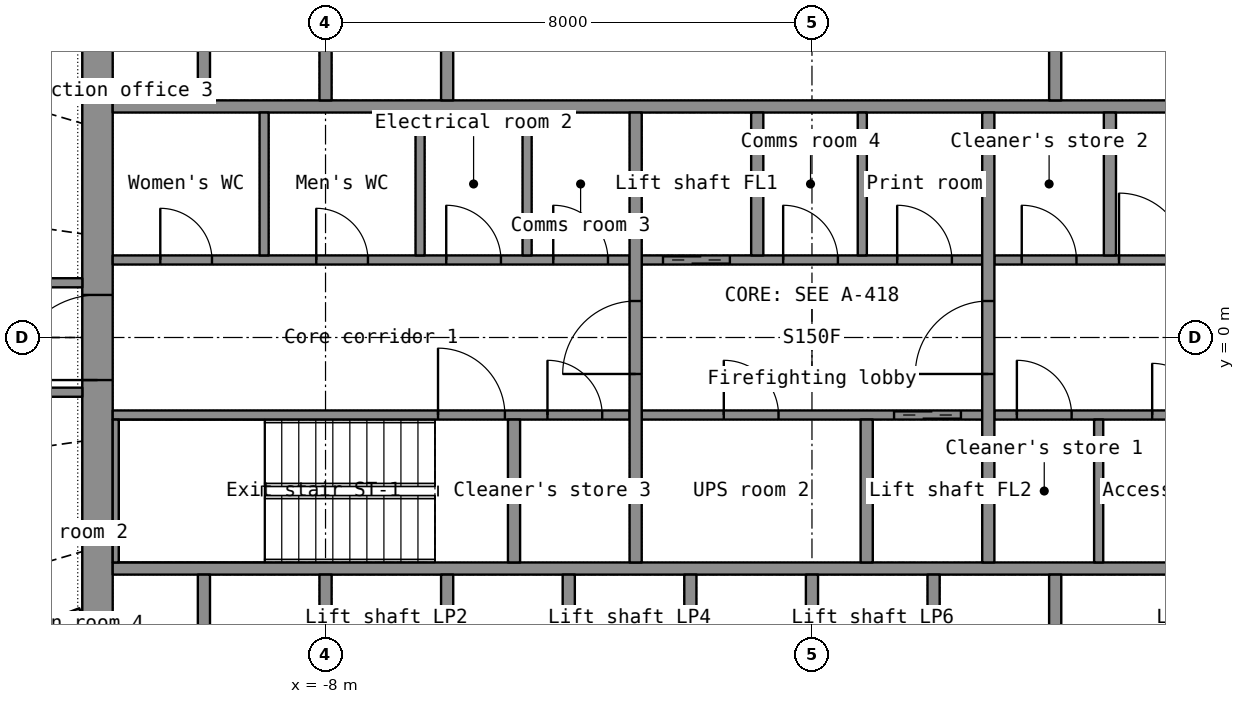
"""IFC4 building model, lengths in metres.
Left out: names, types, materials, properties, quantities, classifications, styles, units other than length and angle.
Written with IfcOpenShell. Run it as: python <this file> out.ifc"""

import sys

from ifc_helpers import new_model, si_unit, direction, frame, frame_2d, origin, place, context, subcontext, project, spatial, rectangle, extrude, element, fill, save


model = new_model("IFC4")
c1 = context("Model", 3, precision=1e-05, world=origin(), true_north=direction((0.0, 1.0)))
c2 = subcontext(c1, "Body", "Model", "MODEL_VIEW")
j1 = project(units=[si_unit("LENGTHUNIT", "METRE"), si_unit("PLANEANGLEUNIT", "RADIAN")], contexts=[c1])
p1 = place(None, origin())
s1 = spatial("IfcSite", under=j1, at=p1, CompositionType="ELEMENT")
p2 = place(p1, origin())
s2 = spatial("IfcBuilding", under=s1, at=p2, CompositionType="ELEMENT")
p3 = place(p2, frame((0.0, 0.0, 130.4)))
s3 = spatial("IfcBuildingStorey", under=s2, at=p3, CompositionType="ELEMENT", Elevation=130.4)
p4 = place(p3, frame((-11.75, -7.2, 0.0), z_axis=(0.0, 0.0, 1.0), x_axis=(0.0, 1.0, 0.0)))
e1 = element("IfcWall", 1, at=p4, inside=s3, PredefinedType="SHEAR", context=c2, shape_type="SweptSolid", body=[
    extrude(rectangle(XDim=14.4, YDim=0.5, at=frame_2d((7.2, 0.0))), origin(), (0.0, 0.0, 1.0), 3.3),
])
p5 = place(p4, frame((6.5, 0.0, 0.0)))
e2 = element("IfcOpeningElement", 2, at=p5, cuts=e1, PredefinedType="OPENING", context=c2, shape_type="SweptSolid", body=[
    extrude(rectangle(XDim=1.4, YDim=2.2, at=frame_2d((0.7, 1.1))), frame((0.0, 0.26, 0.0), z_axis=(0.0, -1.0, 0.0), x_axis=(1.0, 0.0, 0.0)), (0.0, 0.0, 1.0), 0.52),
])
for number, where, z_axis, x_axis in (
    (3, (-11.5, -3.8, 0.0), (0.0, 0.0, 1.0), (1.0, 0.0, 0.0)),
    (4, (-11.5, 3.8, 0.0), (0.0, 0.0, 1.0), (1.0, 0.0, 0.0)),
):
    element("IfcWall", number, at=place(p3, frame(where, z_axis=z_axis, x_axis=x_axis)), inside=s3, PredefinedType="SHEAR", context=c2, shape_type="SweptSolid", body=[
        extrude(rectangle(XDim=23.0, YDim=0.2, at=frame_2d((11.5, 0.0))), origin(), (0.0, 0.0, 1.0), 3.3),
    ])
for number, where, z_axis, x_axis in (
    (5, (-10.0, -6.7, 0.0), (0.0, 0.0, 1.0), (0.0, 1.0, 0.0)),
    (6, (-8.0, -6.7, 0.0), (0.0, 0.0, 1.0), (0.0, 1.0, 0.0)),
    (7, (-6.0, -6.7, 0.0), (0.0, 0.0, 1.0), (0.0, 1.0, 0.0)),
    (8, (-4.0, -6.7, 0.0), (0.0, 0.0, 1.0), (0.0, 1.0, 0.0)),
    (9, (-2.0, -6.7, 0.0), (0.0, 0.0, 1.0), (0.0, 1.0, 0.0)),
    (10, (0.0, -6.7, 0.0), (0.0, 0.0, 1.0), (0.0, 1.0, 0.0)),
    (11, (2.0, -6.7, 0.0), (0.0, 0.0, 1.0), (0.0, 1.0, 0.0)),
    (12, (4.0, -6.7, 0.0), (0.0, 0.0, 1.0), (0.0, 1.0, 0.0)),
    (13, (-10.0, 3.9, 0.0), (0.0, 0.0, 1.0), (0.0, 1.0, 0.0)),
    (14, (-8.0, 3.9, 0.0), (0.0, 0.0, 1.0), (0.0, 1.0, 0.0)),
    (15, (-6.0, 3.9, 0.0), (0.0, 0.0, 1.0), (0.0, 1.0, 0.0)),
):
    element("IfcWall", number, at=place(p3, frame(where, z_axis=z_axis, x_axis=x_axis)), inside=s3, PredefinedType="SHEAR", context=c2, shape_type="SweptSolid", body=[
        extrude(rectangle(XDim=2.8, YDim=0.2, at=frame_2d((1.4, 0.0))), origin(), (0.0, 0.0, 1.0), 3.3),
    ])
p6 = place(p3, frame((4.0, 3.9, 0.0), z_axis=(0.0, 0.0, 1.0), x_axis=(0.0, 1.0, 0.0)))
e16 = element("IfcWall", 16, at=p6, inside=s3, PredefinedType="PARTITIONING", context=c2, shape_type="SweptSolid", body=[
    extrude(rectangle(XDim=2.8, YDim=0.2, at=frame_2d((1.4, 0.0))), origin(), (0.0, 0.0, 1.0), 3.3),
])
p7 = place(p3, frame((-11.5, -1.275, 0.0), z_axis=(0.0, 0.0, 1.0), x_axis=(1.0, 0.0, 0.0)))
e17 = element("IfcWall", 17, at=p7, inside=s3, PredefinedType="SHEAR", context=c2, shape_type="SweptSolid", body=[
    extrude(rectangle(XDim=8.5, YDim=0.15, at=frame_2d((4.25, 0.0))), origin(), (0.0, 0.0, 1.0), 3.3),
])
p8 = place(p7, frame((5.35, 0.0, 0.0)))
e18 = element("IfcOpeningElement", 18, at=p8, cuts=e17, PredefinedType="OPENING", context=c2, shape_type="SweptSolid", body=[
    extrude(rectangle(XDim=1.1, YDim=2.15, at=frame_2d((0.55, 1.075))), frame((0.0, 0.085, 0.0), z_axis=(0.0, -1.0, 0.0), x_axis=(1.0, 0.0, 0.0)), (0.0, 0.0, 1.0), 0.17),
])
p9 = place(p7, frame((7.15, 0.0, 0.0)))
e19 = element("IfcOpeningElement", 19, at=p9, cuts=e17, PredefinedType="OPENING", context=c2, shape_type="SweptSolid", body=[
    extrude(rectangle(XDim=0.9, YDim=2.1, at=frame_2d((0.45, 1.05))), frame((0.0, 0.085, 0.0), z_axis=(0.0, -1.0, 0.0), x_axis=(1.0, 0.0, 0.0)), (0.0, 0.0, 1.0), 0.17),
])
p10 = place(p3, frame((-2.8, -1.275, 0.0), z_axis=(0.0, 0.0, 1.0), x_axis=(1.0, 0.0, 0.0)))
e20 = element("IfcWall", 20, at=p10, inside=s3, PredefinedType="SHEAR", context=c2, shape_type="SweptSolid", body=[
    extrude(rectangle(XDim=5.6, YDim=0.15, at=frame_2d((2.8, 0.0))), origin(), (0.0, 0.0, 1.0), 3.3),
])
p11 = place(p10, frame((4.15, 0.0, 0.0)))
e21 = element("IfcOpeningElement", 21, at=p11, cuts=e20, PredefinedType="OPENING", context=c2, shape_type="SweptSolid", body=[
    extrude(rectangle(XDim=1.1, YDim=2.2, at=frame_2d((0.55, 1.1))), frame((0.0, 0.085, 0.0), z_axis=(0.0, -1.0, 0.0), x_axis=(1.0, 0.0, 0.0)), (0.0, 0.0, 1.0), 0.17),
])
p12 = place(p10, frame((1.35, 0.0, 0.0)))
e22 = element("IfcOpeningElement", 22, at=p12, cuts=e20, PredefinedType="OPENING", context=c2, shape_type="SweptSolid", body=[
    extrude(rectangle(XDim=0.9, YDim=2.1, at=frame_2d((0.45, 1.05))), frame((0.0, 0.085, 0.0), z_axis=(0.0, -1.0, 0.0), x_axis=(1.0, 0.0, 0.0)), (0.0, 0.0, 1.0), 0.17),
])
p13 = place(p3, frame((3.0, -1.275, 0.0), z_axis=(0.0, 0.0, 1.0), x_axis=(1.0, 0.0, 0.0)))
e23 = element("IfcWall", 23, at=p13, inside=s3, PredefinedType="PARTITIONING", context=c2, shape_type="SweptSolid", body=[
    extrude(rectangle(XDim=8.5, YDim=0.15, at=frame_2d((4.25, 0.0))), origin(), (0.0, 0.0, 1.0), 3.3),
])
p14 = place(p13, frame((0.37, 0.0, 0.0)))
e24 = element("IfcOpeningElement", 24, at=p14, cuts=e23, PredefinedType="OPENING", context=c2, shape_type="SweptSolid", body=[
    extrude(rectangle(XDim=0.9, YDim=2.1, at=frame_2d((0.45, 1.05))), frame((0.0, 0.085, 0.0), z_axis=(0.0, -1.0, 0.0), x_axis=(1.0, 0.0, 0.0)), (0.0, 0.0, 1.0), 0.17),
])
p15 = place(p13, frame((2.595, 0.0, 0.0)))
e25 = element("IfcOpeningElement", 25, at=p15, cuts=e23, PredefinedType="OPENING", context=c2, shape_type="SweptSolid", body=[
    extrude(rectangle(XDim=0.85, YDim=2.1, at=frame_2d((0.425, 1.05))), frame((0.0, 0.085, 0.0), z_axis=(0.0, -1.0, 0.0), x_axis=(1.0, 0.0, 0.0)), (0.0, 0.0, 1.0), 0.17),
])
p16 = place(p13, frame((6.025, 0.0, 0.0)))
e26 = element("IfcOpeningElement", 26, at=p16, cuts=e23, PredefinedType="OPENING", context=c2, shape_type="SweptSolid", body=[
    extrude(rectangle(XDim=0.85, YDim=2.1, at=frame_2d((0.425, 1.05))), frame((0.0, 0.085, 0.0), z_axis=(0.0, -1.0, 0.0), x_axis=(1.0, 0.0, 0.0)), (0.0, 0.0, 1.0), 0.17),
])
p17 = place(p3, frame((-11.5, 1.275, 0.0), z_axis=(0.0, 0.0, 1.0), x_axis=(1.0, 0.0, 0.0)))
e27 = element("IfcWall", 27, at=p17, inside=s3, PredefinedType="PARTITIONING", context=c2, shape_type="SweptSolid", body=[
    extrude(rectangle(XDim=8.5, YDim=0.15, at=frame_2d((4.25, 0.0))), origin(), (0.0, 0.0, 1.0), 3.3),
])
p18 = place(p17, frame((0.782, 0.0, 0.0)))
e28 = element("IfcOpeningElement", 28, at=p18, cuts=e27, PredefinedType="OPENING", context=c2, shape_type="SweptSolid", body=[
    extrude(rectangle(XDim=0.85, YDim=2.1, at=frame_2d((0.425, 1.05))), frame((0.0, 0.085, 0.0), z_axis=(0.0, -1.0, 0.0), x_axis=(1.0, 0.0, 0.0)), (0.0, 0.0, 1.0), 0.17),
])
p19 = place(p17, frame((3.347, 0.0, 0.0)))
e29 = element("IfcOpeningElement", 29, at=p19, cuts=e27, PredefinedType="OPENING", context=c2, shape_type="SweptSolid", body=[
    extrude(rectangle(XDim=0.85, YDim=2.1, at=frame_2d((0.425, 1.05))), frame((0.0, 0.085, 0.0), z_axis=(0.0, -1.0, 0.0), x_axis=(1.0, 0.0, 0.0)), (0.0, 0.0, 1.0), 0.17),
])
p20 = place(p17, frame((5.485, 0.0, 0.0)))
e30 = element("IfcOpeningElement", 30, at=p20, cuts=e27, PredefinedType="OPENING", context=c2, shape_type="SweptSolid", body=[
    extrude(rectangle(XDim=0.9, YDim=2.1, at=frame_2d((0.45, 1.05))), frame((0.0, 0.085, 0.0), z_axis=(0.0, -1.0, 0.0), x_axis=(1.0, 0.0, 0.0)), (0.0, 0.0, 1.0), 0.17),
])
p21 = place(p17, frame((7.245, 0.0, 0.0)))
e31 = element("IfcOpeningElement", 31, at=p21, cuts=e27, PredefinedType="OPENING", context=c2, shape_type="SweptSolid", body=[
    extrude(rectangle(XDim=0.9, YDim=2.1, at=frame_2d((0.45, 1.05))), frame((0.0, 0.085, 0.0), z_axis=(0.0, -1.0, 0.0), x_axis=(1.0, 0.0, 0.0)), (0.0, 0.0, 1.0), 0.17),
])
p22 = place(p3, frame((-2.8, 1.275, 0.0), z_axis=(0.0, 0.0, 1.0), x_axis=(1.0, 0.0, 0.0)))
e32 = element("IfcWall", 32, at=p22, inside=s3, PredefinedType="SHEAR", context=c2, shape_type="SweptSolid", body=[
    extrude(rectangle(XDim=5.6, YDim=0.15, at=frame_2d((2.8, 0.0))), origin(), (0.0, 0.0, 1.0), 3.3),
])
p23 = place(p22, frame((0.35, 0.0, 0.0)))
e33 = element("IfcOpeningElement", 33, at=p23, cuts=e32, PredefinedType="OPENING", context=c2, shape_type="SweptSolid", body=[
    extrude(rectangle(XDim=1.1, YDim=2.2, at=frame_2d((0.55, 1.1))), frame((0.0, 0.085, 0.0), z_axis=(0.0, -1.0, 0.0), x_axis=(1.0, 0.0, 0.0)), (0.0, 0.0, 1.0), 0.17),
])
p24 = place(p22, frame((2.326, 0.0, 0.0)))
e34 = element("IfcOpeningElement", 34, at=p24, cuts=e32, PredefinedType="OPENING", context=c2, shape_type="SweptSolid", body=[
    extrude(rectangle(XDim=0.9, YDim=2.1, at=frame_2d((0.45, 1.05))), frame((0.0, 0.085, 0.0), z_axis=(0.0, -1.0, 0.0), x_axis=(1.0, 0.0, 0.0)), (0.0, 0.0, 1.0), 0.17),
])
p25 = place(p22, frame((4.201, 0.0, 0.0)))
e35 = element("IfcOpeningElement", 35, at=p25, cuts=e32, PredefinedType="OPENING", context=c2, shape_type="SweptSolid", body=[
    extrude(rectangle(XDim=0.9, YDim=2.1, at=frame_2d((0.45, 1.05))), frame((0.0, 0.085, 0.0), z_axis=(0.0, -1.0, 0.0), x_axis=(1.0, 0.0, 0.0)), (0.0, 0.0, 1.0), 0.17),
])
p26 = place(p3, frame((3.0, 1.275, 0.0), z_axis=(0.0, 0.0, 1.0), x_axis=(1.0, 0.0, 0.0)))
e36 = element("IfcWall", 36, at=p26, inside=s3, PredefinedType="SHEAR", context=c2, shape_type="SweptSolid", body=[
    extrude(rectangle(XDim=8.5, YDim=0.15, at=frame_2d((4.25, 0.0))), origin(), (0.0, 0.0, 1.0), 3.3),
])
p27 = place(p26, frame((2.05, 0.0, 0.0)))
e37 = element("IfcOpeningElement", 37, at=p27, cuts=e36, PredefinedType="OPENING", context=c2, shape_type="SweptSolid", body=[
    extrude(rectangle(XDim=1.1, YDim=2.15, at=frame_2d((0.55, 1.075))), frame((0.0, 0.085, 0.0), z_axis=(0.0, -1.0, 0.0), x_axis=(1.0, 0.0, 0.0)), (0.0, 0.0, 1.0), 0.17),
])
p28 = place(p26, frame((0.45, 0.0, 0.0)))
e38 = element("IfcOpeningElement", 38, at=p28, cuts=e36, PredefinedType="OPENING", context=c2, shape_type="SweptSolid", body=[
    extrude(rectangle(XDim=0.9, YDim=2.1, at=frame_2d((0.45, 1.05))), frame((0.0, 0.085, 0.0), z_axis=(0.0, -1.0, 0.0), x_axis=(1.0, 0.0, 0.0)), (0.0, 0.0, 1.0), 0.17),
])
p29 = place(p3, frame((-2.9, -3.7, 0.0), z_axis=(0.0, 0.0, 1.0), x_axis=(0.0, 1.0, 0.0)))
e39 = element("IfcWall", 39, at=p29, inside=s3, PredefinedType="SHEAR", context=c2, shape_type="SweptSolid", body=[
    extrude(rectangle(XDim=7.4, YDim=0.2, at=frame_2d((3.7, 0.0))), origin(), (0.0, 0.0, 1.0), 3.3),
])
p30 = place(p29, frame((3.1, 0.0, 0.0)))
e40 = element("IfcOpeningElement", 40, at=p30, cuts=e39, PredefinedType="OPENING", context=c2, shape_type="SweptSolid", body=[
    extrude(rectangle(XDim=1.2, YDim=2.2, at=frame_2d((0.6, 1.1))), frame((0.0, 0.11, 0.0), z_axis=(0.0, -1.0, 0.0), x_axis=(1.0, 0.0, 0.0)), (0.0, 0.0, 1.0), 0.22),
])
p31 = place(p3, frame((2.9, -3.7, 0.0), z_axis=(0.0, 0.0, 1.0), x_axis=(0.0, 1.0, 0.0)))
e41 = element("IfcWall", 41, at=p31, inside=s3, PredefinedType="SHEAR", context=c2, shape_type="SweptSolid", body=[
    extrude(rectangle(XDim=7.4, YDim=0.2, at=frame_2d((3.7, 0.0))), origin(), (0.0, 0.0, 1.0), 3.3),
])
p32 = place(p31, frame((3.1, 0.0, 0.0)))
e42 = element("IfcOpeningElement", 42, at=p32, cuts=e41, PredefinedType="OPENING", context=c2, shape_type="SweptSolid", body=[
    extrude(rectangle(XDim=1.2, YDim=2.2, at=frame_2d((0.6, 1.1))), frame((0.0, 0.11, 0.0), z_axis=(0.0, -1.0, 0.0), x_axis=(1.0, 0.0, 0.0)), (0.0, 0.0, 1.0), 0.22),
])
for number, where, z_axis, x_axis in (
    (43, (-0.9, 1.35, 0.0), (0.0, 0.0, 1.0), (0.0, 1.0, 0.0)),
    (44, (0.9, -3.7, 0.0), (0.0, 0.0, 1.0), (0.0, 1.0, 0.0)),
):
    element("IfcWall", number, at=place(p3, frame(where, z_axis=z_axis, x_axis=x_axis)), inside=s3, PredefinedType="SHEAR", context=c2, shape_type="SweptSolid", body=[
        extrude(rectangle(XDim=2.35, YDim=0.2, at=frame_2d((1.175, 0.0))), origin(), (0.0, 0.0, 1.0), 3.3),
    ])
p33 = place(p3, frame((-11.45, -3.7, 0.0), z_axis=(0.0, 0.0, 1.0), x_axis=(0.0, 1.0, 0.0)))
e45 = element("IfcWall", 45, at=p33, inside=s3, PredefinedType="SHEAR", context=c2, shape_type="SweptSolid", body=[
    extrude(rectangle(XDim=2.35, YDim=0.1, at=frame_2d((1.175, 0.0))), origin(), (0.0, 0.0, 1.0), 3.3),
])
for number, where, z_axis, x_axis in (
    (46, (-4.9, -3.7, 0.0), (0.0, 0.0, 1.0), (0.0, 1.0, 0.0)),
    (47, (4.9, 1.35, 0.0), (0.0, 0.0, 1.0), (0.0, 1.0, 0.0)),
):
    element("IfcWall", number, at=place(p3, frame(where, z_axis=z_axis, x_axis=x_axis)), inside=s3, PredefinedType="SHEAR", context=c2, shape_type="SweptSolid", body=[
        extrude(rectangle(XDim=2.35, YDim=0.2, at=frame_2d((1.175, 0.0))), origin(), (0.0, 0.0, 1.0), 3.3),
    ])
for number, where, z_axis, x_axis in (
    (48, (-9.01, 1.35, 0.0), (0.0, 0.0, 1.0), (0.0, 1.0, 0.0)),
    (49, (-6.445, 1.35, 0.0), (0.0, 0.0, 1.0), (0.0, 1.0, 0.0)),
    (50, (-4.685, 1.35, 0.0), (0.0, 0.0, 1.0), (0.0, 1.0, 0.0)),
    (51, (4.715, -3.7, 0.0), (0.0, 0.0, 1.0), (0.0, 1.0, 0.0)),
    (52, (0.827, 1.35, 0.0), (0.0, 0.0, 1.0), (0.0, 1.0, 0.0)),
):
    element("IfcWall", number, at=place(p3, frame(where, z_axis=z_axis, x_axis=x_axis)), inside=s3, PredefinedType="PARTITIONING", context=c2, shape_type="SweptSolid", body=[
        extrude(rectangle(XDim=2.35, YDim=0.15, at=frame_2d((1.175, 0.0))), origin(), (0.0, 0.0, 1.0), 3.3),
    ])
p34 = place(p3, frame((-15.873, -6.063, 0.0), z_axis=(0.0, 0.0, 1.0), x_axis=(0.934170215, 0.356827703, 0.0)))
e53 = element("IfcWall", 53, at=p34, inside=s3, PredefinedType="PARTITIONING", context=c2, shape_type="SweptSolid", body=[
    extrude(rectangle(XDim=4.146, YDim=0.28, at=frame_2d((2.073, 0.0))), origin(), (0.0, 0.0, 1.0), 2.4),
])
p35 = place(p34, frame((1.323, 0.0, 1.0)))
e54 = element("IfcOpeningElement", 54, at=p35, cuts=e53, PredefinedType="OPENING", context=c2, shape_type="SweptSolid", body=[
    extrude(rectangle(XDim=1.5, YDim=1.2, at=frame_2d((0.75, 0.6))), frame((0.0, 0.15, 0.0), z_axis=(0.0, -1.0, 0.0), x_axis=(1.0, 0.0, 0.0)), (0.0, 0.0, 1.0), 0.3),
])
p36 = place(p3, frame((-12.0, 0.9, 0.0), z_axis=(0.0, 0.0, 1.0), x_axis=(-1.0, 0.0, 0.0)))
e55 = element("IfcWall", 55, at=p36, inside=s3, PredefinedType="PARTITIONING", context=c2, shape_type="SweptSolid", body=[
    extrude(rectangle(XDim=3.923, YDim=0.15, at=frame_2d((1.961, 0.0))), origin(), (0.0, 0.0, 1.0), 2.4),
])
p37 = place(p3, frame((-12.559, -0.9, 0.0), z_axis=(0.0, 0.0, 1.0), x_axis=(1.0, 0.0, 0.0)))
e56 = element("IfcWall", 56, at=p37, inside=s3, PredefinedType="PARTITIONING", context=c2, shape_type="SweptSolid", body=[
    extrude(rectangle(XDim=0.559, YDim=0.15, at=frame_2d((0.279, 0.0))), origin(), (0.0, 0.0, 1.0), 2.4),
])
p38 = place(p5, origin())
e57 = element("IfcDoor", 57, at=p38, inside=s3, OperationType="DOUBLE_DOOR_SINGLE_SWING", PredefinedType="DOOR", context=c2, shape_type="SweptSolid", body=[
    extrude(rectangle(XDim=1.4, YDim=2.2, at=frame_2d((0.7, 1.1))), frame((0.0, 0.025, 0.0), z_axis=(0.0, -1.0, 0.0), x_axis=(1.0, 0.0, 0.0)), (0.0, 0.0, 1.0), 0.05),
])
fill(e2, e57)
p39 = place(p30, origin())
e58 = element("IfcDoor", 58, at=p39, inside=s3, OperationType="SINGLE_SWING_LEFT", PredefinedType="DOOR", context=c2, shape_type="SweptSolid", body=[
    extrude(rectangle(XDim=1.2, YDim=2.2, at=frame_2d((0.6, 1.1))), frame((0.0, 0.025, 0.0), z_axis=(0.0, -1.0, 0.0), x_axis=(1.0, 0.0, 0.0)), (0.0, 0.0, 1.0), 0.05),
])
fill(e40, e58)
p40 = place(p32, origin())
e59 = element("IfcDoor", 59, at=p40, inside=s3, OperationType="SINGLE_SWING_LEFT", PredefinedType="DOOR", context=c2, shape_type="SweptSolid", body=[
    extrude(rectangle(XDim=1.2, YDim=2.2, at=frame_2d((0.6, 1.1))), frame((0.0, 0.025, 0.0), z_axis=(0.0, -1.0, 0.0), x_axis=(1.0, 0.0, 0.0)), (0.0, 0.0, 1.0), 0.05),
])
fill(e42, e59)
p41 = place(p23, origin())
e60 = element("IfcDoor", 60, at=p41, inside=s3, OperationType="DOUBLE_DOOR_SLIDING", PredefinedType="DOOR", context=c2, shape_type="SweptSolid", body=[
    extrude(rectangle(XDim=1.1, YDim=2.2, at=frame_2d((0.55, 1.1))), frame((0.0, 0.025, 0.0), z_axis=(0.0, -1.0, 0.0), x_axis=(1.0, 0.0, 0.0)), (0.0, 0.0, 1.0), 0.05),
])
fill(e33, e60)
p42 = place(p11, origin())
e61 = element("IfcDoor", 61, at=p42, inside=s3, OperationType="DOUBLE_DOOR_SLIDING", PredefinedType="DOOR", context=c2, shape_type="SweptSolid", body=[
    extrude(rectangle(XDim=1.1, YDim=2.2, at=frame_2d((0.55, 1.1))), frame((0.0, 0.025, 0.0), z_axis=(0.0, -1.0, 0.0), x_axis=(1.0, 0.0, 0.0)), (0.0, 0.0, 1.0), 0.05),
])
fill(e21, e61)
p43 = place(p8, origin())
e62 = element("IfcDoor", 62, at=p43, inside=s3, OperationType="SINGLE_SWING_LEFT", PredefinedType="DOOR", context=c2, shape_type="SweptSolid", body=[
    extrude(rectangle(XDim=1.1, YDim=2.15, at=frame_2d((0.55, 1.075))), frame((0.0, 0.025, 0.0), z_axis=(0.0, -1.0, 0.0), x_axis=(1.0, 0.0, 0.0)), (0.0, 0.0, 1.0), 0.05),
])
fill(e18, e62)
p44 = place(p27, origin())
e63 = element("IfcDoor", 63, at=p44, inside=s3, OperationType="SINGLE_SWING_LEFT", PredefinedType="DOOR", context=c2, shape_type="SweptSolid", body=[
    extrude(rectangle(XDim=1.1, YDim=2.15, at=frame_2d((0.55, 1.075))), frame((0.0, 0.025, 0.0), z_axis=(0.0, -1.0, 0.0), x_axis=(1.0, 0.0, 0.0)), (0.0, 0.0, 1.0), 0.05),
])
fill(e37, e63)
p45 = place(p18, origin())
e64 = element("IfcDoor", 64, at=p45, inside=s3, OperationType="SINGLE_SWING_LEFT", PredefinedType="DOOR", context=c2, shape_type="SweptSolid", body=[
    extrude(rectangle(XDim=0.85, YDim=2.1, at=frame_2d((0.425, 1.05))), frame((0.0, 0.025, 0.0), z_axis=(0.0, -1.0, 0.0), x_axis=(1.0, 0.0, 0.0)), (0.0, 0.0, 1.0), 0.05),
])
fill(e28, e64)
p46 = place(p19, origin())
e65 = element("IfcDoor", 65, at=p46, inside=s3, OperationType="SINGLE_SWING_LEFT", PredefinedType="DOOR", context=c2, shape_type="SweptSolid", body=[
    extrude(rectangle(XDim=0.85, YDim=2.1, at=frame_2d((0.425, 1.05))), frame((0.0, 0.025, 0.0), z_axis=(0.0, -1.0, 0.0), x_axis=(1.0, 0.0, 0.0)), (0.0, 0.0, 1.0), 0.05),
])
fill(e29, e65)
p47 = place(p20, origin())
e66 = element("IfcDoor", 66, at=p47, inside=s3, OperationType="SINGLE_SWING_LEFT", PredefinedType="DOOR", context=c2, shape_type="SweptSolid", body=[
    extrude(rectangle(XDim=0.9, YDim=2.1, at=frame_2d((0.45, 1.05))), frame((0.0, 0.025, 0.0), z_axis=(0.0, -1.0, 0.0), x_axis=(1.0, 0.0, 0.0)), (0.0, 0.0, 1.0), 0.05),
])
fill(e30, e66)
p48 = place(p21, origin())
e67 = element("IfcDoor", 67, at=p48, inside=s3, OperationType="SINGLE_SWING_LEFT", PredefinedType="DOOR", context=c2, shape_type="SweptSolid", body=[
    extrude(rectangle(XDim=0.9, YDim=2.1, at=frame_2d((0.45, 1.05))), frame((0.0, 0.025, 0.0), z_axis=(0.0, -1.0, 0.0), x_axis=(1.0, 0.0, 0.0)), (0.0, 0.0, 1.0), 0.05),
])
fill(e31, e67)
p49 = place(p14, origin())
e68 = element("IfcDoor", 68, at=p49, inside=s3, OperationType="SINGLE_SWING_LEFT", PredefinedType="DOOR", context=c2, shape_type="SweptSolid", body=[
    extrude(rectangle(XDim=0.9, YDim=2.1, at=frame_2d((0.45, 1.05))), frame((0.0, 0.025, 0.0), z_axis=(0.0, -1.0, 0.0), x_axis=(1.0, 0.0, 0.0)), (0.0, 0.0, 1.0), 0.05),
])
fill(e24, e68)
p50 = place(p15, origin())
e69 = element("IfcDoor", 69, at=p50, inside=s3, OperationType="SINGLE_SWING_LEFT", PredefinedType="DOOR", context=c2, shape_type="SweptSolid", body=[
    extrude(rectangle(XDim=0.85, YDim=2.1, at=frame_2d((0.425, 1.05))), frame((0.0, 0.025, 0.0), z_axis=(0.0, -1.0, 0.0), x_axis=(1.0, 0.0, 0.0)), (0.0, 0.0, 1.0), 0.05),
])
fill(e25, e69)
p51 = place(p24, origin())
e70 = element("IfcDoor", 70, at=p51, inside=s3, OperationType="SINGLE_SWING_LEFT", PredefinedType="DOOR", context=c2, shape_type="SweptSolid", body=[
    extrude(rectangle(XDim=0.9, YDim=2.1, at=frame_2d((0.45, 1.05))), frame((0.0, 0.025, 0.0), z_axis=(0.0, -1.0, 0.0), x_axis=(1.0, 0.0, 0.0)), (0.0, 0.0, 1.0), 0.05),
])
fill(e34, e70)
p52 = place(p25, origin())
e71 = element("IfcDoor", 71, at=p52, inside=s3, OperationType="SINGLE_SWING_LEFT", PredefinedType="DOOR", context=c2, shape_type="SweptSolid", body=[
    extrude(rectangle(XDim=0.9, YDim=2.1, at=frame_2d((0.45, 1.05))), frame((0.0, 0.025, 0.0), z_axis=(0.0, -1.0, 0.0), x_axis=(1.0, 0.0, 0.0)), (0.0, 0.0, 1.0), 0.05),
])
fill(e35, e71)
p53 = place(p12, origin())
e72 = element("IfcDoor", 72, at=p53, inside=s3, OperationType="SINGLE_SWING_LEFT", PredefinedType="DOOR", context=c2, shape_type="SweptSolid", body=[
    extrude(rectangle(XDim=0.9, YDim=2.1, at=frame_2d((0.45, 1.05))), frame((0.0, 0.025, 0.0), z_axis=(0.0, -1.0, 0.0), x_axis=(1.0, 0.0, 0.0)), (0.0, 0.0, 1.0), 0.05),
])
fill(e22, e72)
p54 = place(p28, origin())
e73 = element("IfcDoor", 73, at=p54, inside=s3, OperationType="SINGLE_SWING_LEFT", PredefinedType="DOOR", context=c2, shape_type="SweptSolid", body=[
    extrude(rectangle(XDim=0.9, YDim=2.1, at=frame_2d((0.45, 1.05))), frame((0.0, 0.025, 0.0), z_axis=(0.0, -1.0, 0.0), x_axis=(1.0, 0.0, 0.0)), (0.0, 0.0, 1.0), 0.05),
])
fill(e38, e73)
p55 = place(p9, origin())
e74 = element("IfcDoor", 74, at=p55, inside=s3, OperationType="SINGLE_SWING_LEFT", PredefinedType="DOOR", context=c2, shape_type="SweptSolid", body=[
    extrude(rectangle(XDim=0.9, YDim=2.1, at=frame_2d((0.45, 1.05))), frame((0.0, 0.025, 0.0), z_axis=(0.0, -1.0, 0.0), x_axis=(1.0, 0.0, 0.0)), (0.0, 0.0, 1.0), 0.05),
])
fill(e19, e74)
save(model, sys.argv[1])
